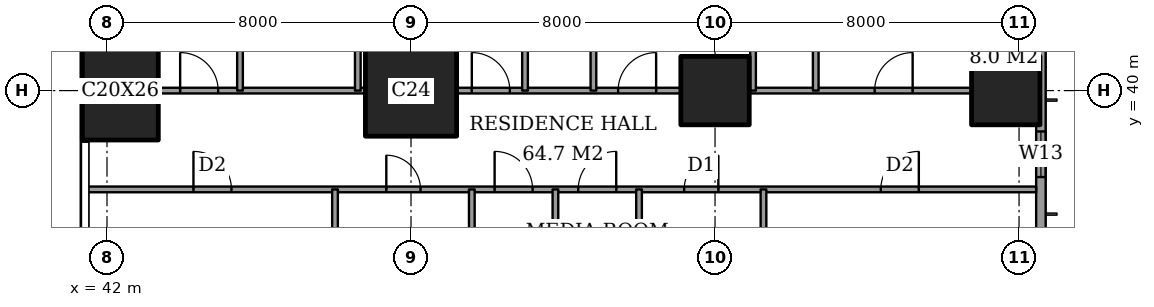
"""IFC4 building model, lengths in metres.
Left out: names, types, materials, properties, quantities, classifications, styles, units other than length and angle.
Written with IfcOpenShell. Run it as: python <this file> out.ifc"""

import sys

from ifc_helpers import new_model, si_unit, direction, frame, frame_2d, origin, origin_2d, place, context, subcontext, project, spatial, rectangle, extrude, element, fill, save


model = new_model("IFC4")
c1 = context("Model", 3, precision=1e-05, world=origin(), true_north=direction((0.0, 1.0)))
c2 = subcontext(c1, "Body", "Model", "MODEL_VIEW")
j1 = project(units=[si_unit("LENGTHUNIT", "METRE"), si_unit("PLANEANGLEUNIT", "RADIAN")], contexts=[c1])
p1 = place(None, origin())
s1 = spatial("IfcSite", under=j1, at=p1, CompositionType="ELEMENT")
p2 = place(p1, origin())
s2 = spatial("IfcBuilding", under=s1, at=p2, CompositionType="ELEMENT")
p3 = place(p2, frame((0.0, 0.0, 221.8)))
s3 = spatial("IfcBuildingStorey", under=s2, at=p3, CompositionType="ELEMENT", Elevation=221.8)
p4 = place(p3, frame((42.35, 40.0, 0.0), z_axis=(0.0, 0.0, 1.0), x_axis=(1.0, 0.0, 0.0)))
e1 = element("IfcColumn", 1, at=p4, inside=s3, PredefinedType="COLUMN", context=c2, shape_type="SweptSolid", body=[
    extrude(rectangle(XDim=2.0, YDim=2.6, at=origin_2d()), origin(), (0.0, 0.0, 1.0), 3.6),
])
p5 = place(p3, frame((50.0, 40.0, 0.0), z_axis=(0.0, 0.0, 1.0), x_axis=(1.0, 0.0, 0.0)))
e2 = element("IfcColumn", 2, at=p5, inside=s3, PredefinedType="COLUMN", context=c2, shape_type="SweptSolid", body=[
    extrude(rectangle(XDim=2.4, YDim=2.4, at=origin_2d()), origin(), (0.0, 0.0, 1.0), 3.6),
])
for number, where, z_axis, x_axis in (
    (3, (58.0, 40.0, 0.0), (0.0, 0.0, 1.0), (1.0, 0.0, 0.0)),
    (4, (65.65, 40.0, 0.0), (0.0, 0.0, 1.0), (1.0, 0.0, 0.0)),
):
    element("IfcColumn", number, at=place(p3, frame(where, z_axis=z_axis, x_axis=x_axis)), inside=s3, PredefinedType="COLUMN", context=c2, shape_type="SweptSolid", body=[
        extrude(rectangle(XDim=1.8, YDim=1.8, at=origin_2d()), origin(), (0.0, 0.0, 1.0), 3.6),
    ])
p6 = place(p3, frame((66.575, 3.175, 0.0), z_axis=(0.0, 0.0, 1.0), x_axis=(0.0, 1.0, 0.0)))
e5 = element("IfcWall", 5, at=p6, inside=s3, PredefinedType="SOLIDWALL", context=c2, shape_type="SweptSolid", body=[
    extrude(rectangle(XDim=41.65, YDim=0.25, at=frame_2d((20.825, 0.0))), origin(), (0.0, 0.0, 1.0), 3.6),
])
p7 = place(p6, frame((0.825, 0.0, 0.2)))
e6 = element("IfcOpeningElement", 6, at=p7, cuts=e5, PredefinedType="OPENING", context=c2, shape_type="SweptSolid", body=[
    extrude(rectangle(XDim=2.4, YDim=2.4, at=frame_2d((1.2, 1.2))), frame((0.0, 0.135, 0.0), z_axis=(0.0, -1.0, 0.0), x_axis=(1.0, 0.0, 0.0)), (0.0, 0.0, 1.0), 0.27),
])
p8 = place(p6, frame((6.225, 0.0, 0.2)))
e7 = element("IfcOpeningElement", 7, at=p8, cuts=e5, PredefinedType="OPENING", context=c2, shape_type="SweptSolid", body=[
    extrude(rectangle(XDim=1.2, YDim=2.4, at=frame_2d((0.6, 1.2))), frame((0.0, 0.135, 0.0), z_axis=(0.0, -1.0, 0.0), x_axis=(1.0, 0.0, 0.0)), (0.0, 0.0, 1.0), 0.27),
])
p9 = place(p6, frame((8.675, 0.0, 0.2)))
e8 = element("IfcOpeningElement", 8, at=p9, cuts=e5, PredefinedType="OPENING", context=c2, shape_type="SweptSolid", body=[
    extrude(rectangle(XDim=2.4, YDim=2.4, at=frame_2d((1.2, 1.2))), frame((0.0, 0.135, 0.0), z_axis=(0.0, -1.0, 0.0), x_axis=(1.0, 0.0, 0.0)), (0.0, 0.0, 1.0), 0.27),
])
p10 = place(p6, frame((15.675, 0.0, 0.2)))
e9 = element("IfcOpeningElement", 9, at=p10, cuts=e5, PredefinedType="OPENING", context=c2, shape_type="SweptSolid", body=[
    extrude(rectangle(XDim=2.4, YDim=2.4, at=frame_2d((1.2, 1.2))), frame((0.0, 0.135, 0.0), z_axis=(0.0, -1.0, 0.0), x_axis=(1.0, 0.0, 0.0)), (0.0, 0.0, 1.0), 0.27),
])
p11 = place(p6, frame((23.575, 0.0, 0.2)))
e10 = element("IfcOpeningElement", 10, at=p11, cuts=e5, PredefinedType="OPENING", context=c2, shape_type="SweptSolid", body=[
    extrude(rectangle(XDim=2.4, YDim=2.4, at=frame_2d((1.2, 1.2))), frame((0.0, 0.135, 0.0), z_axis=(0.0, -1.0, 0.0), x_axis=(1.0, 0.0, 0.0)), (0.0, 0.0, 1.0), 0.27),
])
p12 = place(p6, frame((30.775, 0.0, 0.2)))
e11 = element("IfcOpeningElement", 11, at=p12, cuts=e5, PredefinedType="OPENING", context=c2, shape_type="SweptSolid", body=[
    extrude(rectangle(XDim=2.4, YDim=2.4, at=frame_2d((1.2, 1.2))), frame((0.0, 0.135, 0.0), z_axis=(0.0, -1.0, 0.0), x_axis=(1.0, 0.0, 0.0)), (0.0, 0.0, 1.0), 0.27),
])
p13 = place(p6, frame((34.55, 0.0, 0.2)))
e12 = element("IfcOpeningElement", 12, at=p13, cuts=e5, PredefinedType="OPENING", context=c2, shape_type="SweptSolid", body=[
    extrude(rectangle(XDim=1.2, YDim=2.4, at=frame_2d((0.6, 1.2))), frame((0.0, 0.135, 0.0), z_axis=(0.0, -1.0, 0.0), x_axis=(1.0, 0.0, 0.0)), (0.0, 0.0, 1.0), 0.27),
])
p14 = place(p6, frame((38.425, 0.0, 0.2)))
e13 = element("IfcOpeningElement", 13, at=p14, cuts=e5, PredefinedType="OPENING", context=c2, shape_type="SweptSolid", body=[
    extrude(rectangle(XDim=2.4, YDim=2.4, at=frame_2d((1.2, 1.2))), frame((0.0, 0.135, 0.0), z_axis=(0.0, -1.0, 0.0), x_axis=(1.0, 0.0, 0.0)), (0.0, 0.0, 1.0), 0.27),
])
p15 = place(p3, frame((41.439, 37.4, 0.0), z_axis=(0.0, 0.0, 1.0), x_axis=(1.0, 0.0, 0.0)))
e14 = element("IfcWall", 14, at=p15, inside=s3, PredefinedType="PARTITIONING", context=c2, shape_type="SweptSolid", body=[
    extrude(rectangle(XDim=25.011, YDim=0.15, at=frame_2d((12.505, 0.0))), origin(), (0.0, 0.0, 1.0), 3.25),
])
p16 = place(p15, frame((10.761, 0.0, 0.0)))
e15 = element("IfcOpeningElement", 15, at=p16, cuts=e14, PredefinedType="OPENING", context=c2, shape_type="SweptSolid", body=[
    extrude(rectangle(XDim=1.0, YDim=2.1, at=frame_2d((0.5, 1.05))), frame((0.0, 0.085, 0.0), z_axis=(0.0, -1.0, 0.0), x_axis=(1.0, 0.0, 0.0)), (0.0, 0.0, 1.0), 0.17),
])
p17 = place(p15, frame((20.924, 0.0, 0.0)))
e16 = element("IfcOpeningElement", 16, at=p17, cuts=e14, PredefinedType="OPENING", context=c2, shape_type="SweptSolid", body=[
    extrude(rectangle(XDim=1.0, YDim=2.1, at=frame_2d((0.5, 1.05))), frame((0.0, 0.085, 0.0), z_axis=(0.0, -1.0, 0.0), x_axis=(1.0, 0.0, 0.0)), (0.0, 0.0, 1.0), 0.17),
])
p18 = place(p15, frame((15.749, 0.0, 0.0)))
e17 = element("IfcOpeningElement", 17, at=p18, cuts=e14, PredefinedType="OPENING", context=c2, shape_type="SweptSolid", body=[
    extrude(rectangle(XDim=0.9, YDim=2.1, at=frame_2d((0.45, 1.05))), frame((0.0, 0.085, 0.0), z_axis=(0.0, -1.0, 0.0), x_axis=(1.0, 0.0, 0.0)), (0.0, 0.0, 1.0), 0.17),
])
p19 = place(p15, frame((12.961, 0.0, 0.0)))
e18 = element("IfcOpeningElement", 18, at=p19, cuts=e14, PredefinedType="OPENING", context=c2, shape_type="SweptSolid", body=[
    extrude(rectangle(XDim=1.0, YDim=2.1, at=frame_2d((0.5, 1.05))), frame((0.0, 0.085, 0.0), z_axis=(0.0, -1.0, 0.0), x_axis=(1.0, 0.0, 0.0)), (0.0, 0.0, 1.0), 0.17),
])
p20 = place(p15, frame((7.911, 0.0, 0.0)))
e19 = element("IfcOpeningElement", 19, at=p20, cuts=e14, PredefinedType="OPENING", context=c2, shape_type="SweptSolid", body=[
    extrude(rectangle(XDim=0.9, YDim=2.1, at=frame_2d((0.45, 1.05))), frame((0.0, 0.085, 0.0), z_axis=(0.0, -1.0, 0.0), x_axis=(1.0, 0.0, 0.0)), (0.0, 0.0, 1.0), 0.17),
])
p21 = place(p15, frame((2.836, 0.0, 0.0)))
e20 = element("IfcOpeningElement", 20, at=p21, cuts=e14, PredefinedType="OPENING", context=c2, shape_type="SweptSolid", body=[
    extrude(rectangle(XDim=1.0, YDim=2.1, at=frame_2d((0.5, 1.05))), frame((0.0, 0.085, 0.0), z_axis=(0.0, -1.0, 0.0), x_axis=(1.0, 0.0, 0.0)), (0.0, 0.0, 1.0), 0.17),
])
p22 = place(p3, frame((43.35, 40.0, 0.0), z_axis=(0.0, 0.0, 1.0), x_axis=(1.0, 0.0, 0.0)))
e21 = element("IfcWall", 21, at=p22, inside=s3, PredefinedType="PARTITIONING", context=c2, shape_type="SweptSolid", body=[
    extrude(rectangle(XDim=5.45, YDim=0.15, at=frame_2d((2.725, 0.0))), origin(), (0.0, 0.0, 1.0), 3.25),
])
p23 = place(p22, frame((0.575, 0.0, 0.0)))
e22 = element("IfcOpeningElement", 22, at=p23, cuts=e21, PredefinedType="OPENING", context=c2, shape_type="SweptSolid", body=[
    extrude(rectangle(XDim=1.0, YDim=2.1, at=frame_2d((0.5, 1.05))), frame((0.0, 0.085, 0.0), z_axis=(0.0, -1.0, 0.0), x_axis=(1.0, 0.0, 0.0)), (0.0, 0.0, 1.0), 0.17),
])
p24 = place(p3, frame((51.2, 40.0, 0.0), z_axis=(0.0, 0.0, 1.0), x_axis=(1.0, 0.0, 0.0)))
e23 = element("IfcWall", 23, at=p24, inside=s3, PredefinedType="PARTITIONING", context=c2, shape_type="SweptSolid", body=[
    extrude(rectangle(XDim=5.9, YDim=0.15, at=frame_2d((2.95, 0.0))), origin(), (0.0, 0.0, 1.0), 3.25),
])
p25 = place(p24, frame((4.25, 0.0, 0.0)))
e24 = element("IfcOpeningElement", 24, at=p25, cuts=e23, PredefinedType="OPENING", context=c2, shape_type="SweptSolid", body=[
    extrude(rectangle(XDim=1.0, YDim=2.1, at=frame_2d((0.5, 1.05))), frame((0.0, 0.085, 0.0), z_axis=(0.0, -1.0, 0.0), x_axis=(1.0, 0.0, 0.0)), (0.0, 0.0, 1.0), 0.17),
])
p26 = place(p24, frame((0.4, 0.0, 0.0)))
e25 = element("IfcOpeningElement", 25, at=p26, cuts=e23, PredefinedType="OPENING", context=c2, shape_type="SweptSolid", body=[
    extrude(rectangle(XDim=1.0, YDim=2.1, at=frame_2d((0.5, 1.05))), frame((0.0, 0.085, 0.0), z_axis=(0.0, -1.0, 0.0), x_axis=(1.0, 0.0, 0.0)), (0.0, 0.0, 1.0), 0.17),
])
p27 = place(p3, frame((58.9, 40.0, 0.0), z_axis=(0.0, 0.0, 1.0), x_axis=(1.0, 0.0, 0.0)))
e26 = element("IfcWall", 26, at=p27, inside=s3, PredefinedType="PARTITIONING", context=c2, shape_type="SweptSolid", body=[
    extrude(rectangle(XDim=5.85, YDim=0.15, at=frame_2d((2.925, 0.0))), origin(), (0.0, 0.0, 1.0), 3.25),
])
p28 = place(p27, frame((3.3, 0.0, 0.0)))
e27 = element("IfcOpeningElement", 27, at=p28, cuts=e26, PredefinedType="OPENING", context=c2, shape_type="SweptSolid", body=[
    extrude(rectangle(XDim=1.0, YDim=2.1, at=frame_2d((0.5, 1.05))), frame((0.0, 0.085, 0.0), z_axis=(0.0, -1.0, 0.0), x_axis=(1.0, 0.0, 0.0)), (0.0, 0.0, 1.0), 0.17),
])
p29 = place(p3, frame((45.5, 40.0, 0.0), z_axis=(0.0, 0.0, 1.0), x_axis=(0.0, 1.0, 0.0)))
e28 = element("IfcWall", 28, at=p29, inside=s3, PredefinedType="PARTITIONING", context=c2, shape_type="SweptSolid", body=[
    extrude(rectangle(XDim=8.45, YDim=0.15, at=frame_2d((4.225, 0.0))), origin(), (0.0, 0.0, 1.0), 3.25),
])
p30 = place(p3, frame((48.0, 28.0, 0.0), z_axis=(0.0, 0.0, 1.0), x_axis=(0.0, 1.0, 0.0)))
e29 = element("IfcWall", 29, at=p30, inside=s3, PredefinedType="PARTITIONING", context=c2, shape_type="SweptSolid", body=[
    extrude(rectangle(XDim=9.4, YDim=0.15, at=frame_2d((4.7, 0.0))), origin(), (0.0, 0.0, 1.0), 3.25),
])
p31 = place(p30, frame((0.5, 0.0, 0.0)))
e30 = element("IfcOpeningElement", 30, at=p31, cuts=e29, PredefinedType="OPENING", context=c2, shape_type="SweptSolid", body=[
    extrude(rectangle(XDim=1.0, YDim=2.1, at=frame_2d((0.5, 1.05))), frame((0.0, 0.085, 0.0), z_axis=(0.0, -1.0, 0.0), x_axis=(1.0, 0.0, 0.0)), (0.0, 0.0, 1.0), 0.17),
])
p32 = place(p3, frame((48.6, 40.0, 0.0), z_axis=(0.0, 0.0, 1.0), x_axis=(0.0, 1.0, 0.0)))
e31 = element("IfcWall", 31, at=p32, inside=s3, PredefinedType="PARTITIONING", context=c2, shape_type="SweptSolid", body=[
    extrude(rectangle(XDim=8.45, YDim=0.15, at=frame_2d((4.225, 0.0))), origin(), (0.0, 0.0, 1.0), 3.25),
])
p33 = place(p32, frame((3.775, 0.0, 0.0)))
e32 = element("IfcOpeningElement", 32, at=p33, cuts=e31, PredefinedType="OPENING", context=c2, shape_type="SweptSolid", body=[
    extrude(rectangle(XDim=0.9, YDim=2.1, at=frame_2d((0.45, 1.05))), frame((0.0, 0.085, 0.0), z_axis=(0.0, -1.0, 0.0), x_axis=(1.0, 0.0, 0.0)), (0.0, 0.0, 1.0), 0.17),
])
p34 = place(p3, frame((51.6, 30.0, 0.0), z_axis=(0.0, 0.0, 1.0), x_axis=(0.0, 1.0, 0.0)))
e33 = element("IfcWall", 33, at=p34, inside=s3, PredefinedType="PARTITIONING", context=c2, shape_type="SweptSolid", body=[
    extrude(rectangle(XDim=7.4, YDim=0.15, at=frame_2d((3.7, 0.0))), origin(), (0.0, 0.0, 1.0), 3.25),
])
p35 = place(p3, frame((53.0, 40.0, 0.0), z_axis=(0.0, 0.0, 1.0), x_axis=(0.0, 1.0, 0.0)))
e34 = element("IfcWall", 34, at=p35, inside=s3, PredefinedType="PARTITIONING", context=c2, shape_type="SweptSolid", body=[
    extrude(rectangle(XDim=8.45, YDim=0.15, at=frame_2d((4.225, 0.0))), origin(), (0.0, 0.0, 1.0), 3.25),
])
p36 = place(p3, frame((53.8, 30.0, 0.0), z_axis=(0.0, 0.0, 1.0), x_axis=(0.0, 1.0, 0.0)))
e35 = element("IfcWall", 35, at=p36, inside=s3, PredefinedType="PARTITIONING", context=c2, shape_type="SweptSolid", body=[
    extrude(rectangle(XDim=7.4, YDim=0.15, at=frame_2d((3.7, 0.0))), origin(), (0.0, 0.0, 1.0), 3.25),
])
p37 = place(p3, frame((54.8, 40.0, 0.0), z_axis=(0.0, 0.0, 1.0), x_axis=(0.0, 1.0, 0.0)))
e36 = element("IfcWall", 36, at=p37, inside=s3, PredefinedType="PARTITIONING", context=c2, shape_type="SweptSolid", body=[
    extrude(rectangle(XDim=8.45, YDim=0.15, at=frame_2d((4.225, 0.0))), origin(), (0.0, 0.0, 1.0), 3.25),
])
p38 = place(p37, frame((3.775, 0.0, 0.0)))
e37 = element("IfcOpeningElement", 37, at=p38, cuts=e36, PredefinedType="OPENING", context=c2, shape_type="SweptSolid", body=[
    extrude(rectangle(XDim=0.9, YDim=2.1, at=frame_2d((0.45, 1.05))), frame((0.0, 0.085, 0.0), z_axis=(0.0, -1.0, 0.0), x_axis=(1.0, 0.0, 0.0)), (0.0, 0.0, 1.0), 0.17),
])
p39 = place(p3, frame((56.0, 28.0, 0.0), z_axis=(0.0, 0.0, 1.0), x_axis=(0.0, 1.0, 0.0)))
e38 = element("IfcWall", 38, at=p39, inside=s3, PredefinedType="PARTITIONING", context=c2, shape_type="SweptSolid", body=[
    extrude(rectangle(XDim=9.4, YDim=0.15, at=frame_2d((4.7, 0.0))), origin(), (0.0, 0.0, 1.0), 3.25),
])
p40 = place(p39, frame((0.5, 0.0, 0.0)))
e39 = element("IfcOpeningElement", 39, at=p40, cuts=e38, PredefinedType="OPENING", context=c2, shape_type="SweptSolid", body=[
    extrude(rectangle(XDim=1.0, YDim=2.1, at=frame_2d((0.5, 1.05))), frame((0.0, 0.085, 0.0), z_axis=(0.0, -1.0, 0.0), x_axis=(1.0, 0.0, 0.0)), (0.0, 0.0, 1.0), 0.17),
])
p41 = place(p3, frame((59.0, 40.0, 0.0), z_axis=(0.0, 0.0, 1.0), x_axis=(0.0, 1.0, 0.0)))
e40 = element("IfcWall", 40, at=p41, inside=s3, PredefinedType="PARTITIONING", context=c2, shape_type="SweptSolid", body=[
    extrude(rectangle(XDim=8.45, YDim=0.15, at=frame_2d((4.225, 0.0))), origin(), (0.0, 0.0, 1.0), 3.25),
])
p42 = place(p3, frame((59.275, 33.2, 0.0), z_axis=(0.0, 0.0, 1.0), x_axis=(0.0, 1.0, 0.0)))
e41 = element("IfcWall", 41, at=p42, inside=s3, PredefinedType="PARTITIONING", context=c2, shape_type="SweptSolid", body=[
    extrude(rectangle(XDim=4.2, YDim=0.15, at=frame_2d((2.1, 0.0))), origin(), (0.0, 0.0, 1.0), 3.25),
])
p43 = place(p3, frame((60.65, 40.0, 0.0), z_axis=(0.0, 0.0, 1.0), x_axis=(0.0, 1.0, 0.0)))
e42 = element("IfcWall", 42, at=p43, inside=s3, PredefinedType="PARTITIONING", context=c2, shape_type="SweptSolid", body=[
    extrude(rectangle(XDim=8.45, YDim=0.15, at=frame_2d((4.225, 0.0))), origin(), (0.0, 0.0, 1.0), 3.25),
])
p44 = place(p43, frame((3.775, 0.0, 0.0)))
e43 = element("IfcOpeningElement", 43, at=p44, cuts=e42, PredefinedType="OPENING", context=c2, shape_type="SweptSolid", body=[
    extrude(rectangle(XDim=0.9, YDim=2.1, at=frame_2d((0.45, 1.05))), frame((0.0, 0.085, 0.0), z_axis=(0.0, -1.0, 0.0), x_axis=(1.0, 0.0, 0.0)), (0.0, 0.0, 1.0), 0.17),
])
p45 = place(p3, frame((64.75, 40.9, 0.0), z_axis=(0.0, 0.0, 1.0), x_axis=(0.0, 1.0, 0.0)))
e44 = element("IfcWall", 44, at=p45, inside=s3, PredefinedType="PARTITIONING", context=c2, shape_type="SweptSolid", body=[
    extrude(rectangle(XDim=3.8, YDim=0.15, at=frame_2d((1.9, 0.0))), origin(), (0.0, 0.0, 1.0), 3.25),
])
p46 = place(p45, frame((1.45, 0.0, 0.0)))
e45 = element("IfcOpeningElement", 45, at=p46, cuts=e44, PredefinedType="OPENING", context=c2, shape_type="SweptSolid", body=[
    extrude(rectangle(XDim=0.9, YDim=2.1, at=frame_2d((0.45, 1.05))), frame((0.0, 0.085, 0.0), z_axis=(0.0, -1.0, 0.0), x_axis=(1.0, 0.0, 0.0)), (0.0, 0.0, 1.0), 0.17),
])
p47 = place(p13, origin())
e46 = element("IfcWindow", 46, at=p47, inside=s3, PartitioningType="SINGLE_PANEL", PredefinedType="WINDOW", context=c2, shape_type="SweptSolid", body=[
    extrude(rectangle(XDim=1.2, YDim=2.4, at=frame_2d((0.6, 1.2))), frame((0.0, 0.03, 0.0), z_axis=(0.0, -1.0, 0.0), x_axis=(1.0, 0.0, 0.0)), (0.0, 0.0, 1.0), 0.06),
])
fill(e12, e46)
p48 = place(p28, origin())
e47 = element("IfcDoor", 47, at=p48, inside=s3, OperationType="SINGLE_SWING_LEFT", PredefinedType="DOOR", context=c2, shape_type="SweptSolid", body=[
    extrude(rectangle(XDim=1.0, YDim=2.1, at=frame_2d((0.5, 1.05))), frame((0.0, 0.025, 0.0), z_axis=(0.0, -1.0, 0.0), x_axis=(1.0, 0.0, 0.0)), (0.0, 0.0, 1.0), 0.05),
])
fill(e27, e47)
p49 = place(p25, origin())
e48 = element("IfcDoor", 48, at=p49, inside=s3, OperationType="SINGLE_SWING_LEFT", PredefinedType="DOOR", context=c2, shape_type="SweptSolid", body=[
    extrude(rectangle(XDim=1.0, YDim=2.1, at=frame_2d((0.5, 1.05))), frame((0.0, 0.025, 0.0), z_axis=(0.0, -1.0, 0.0), x_axis=(1.0, 0.0, 0.0)), (0.0, 0.0, 1.0), 0.05),
])
fill(e24, e48)
p50 = place(p26, origin())
e49 = element("IfcDoor", 49, at=p50, inside=s3, OperationType="SINGLE_SWING_RIGHT", PredefinedType="DOOR", context=c2, shape_type="SweptSolid", body=[
    extrude(rectangle(XDim=1.0, YDim=2.1, at=frame_2d((0.5, 1.05))), frame((0.0, 0.025, 0.0), z_axis=(0.0, -1.0, 0.0), x_axis=(1.0, 0.0, 0.0)), (0.0, 0.0, 1.0), 0.05),
])
fill(e25, e49)
p51 = place(p23, origin())
e50 = element("IfcDoor", 50, at=p51, inside=s3, OperationType="SINGLE_SWING_RIGHT", PredefinedType="DOOR", context=c2, shape_type="SweptSolid", body=[
    extrude(rectangle(XDim=1.0, YDim=2.1, at=frame_2d((0.5, 1.05))), frame((0.0, 0.025, 0.0), z_axis=(0.0, -1.0, 0.0), x_axis=(1.0, 0.0, 0.0)), (0.0, 0.0, 1.0), 0.05),
])
fill(e22, e50)
p52 = place(p16, origin())
e51 = element("IfcDoor", 51, at=p52, inside=s3, OperationType="SINGLE_SWING_RIGHT", PredefinedType="DOOR", context=c2, shape_type="SweptSolid", body=[
    extrude(rectangle(XDim=1.0, YDim=2.1, at=frame_2d((0.5, 1.05))), frame((0.0, 0.025, 0.0), z_axis=(0.0, -1.0, 0.0), x_axis=(1.0, 0.0, 0.0)), (0.0, 0.0, 1.0), 0.05),
])
fill(e15, e51)
p53 = place(p17, origin())
e52 = element("IfcDoor", 52, at=p53, inside=s3, OperationType="SINGLE_SWING_LEFT", PredefinedType="DOOR", context=c2, shape_type="SweptSolid", body=[
    extrude(rectangle(XDim=1.0, YDim=2.1, at=frame_2d((0.5, 1.05))), frame((0.0, 0.025, 0.0), z_axis=(0.0, -1.0, 0.0), x_axis=(1.0, 0.0, 0.0)), (0.0, 0.0, 1.0), 0.05),
])
fill(e16, e52)
p54 = place(p18, origin())
e53 = element("IfcDoor", 53, at=p54, inside=s3, OperationType="SINGLE_SWING_LEFT", PredefinedType="DOOR", context=c2, shape_type="SweptSolid", body=[
    extrude(rectangle(XDim=0.9, YDim=2.1, at=frame_2d((0.45, 1.05))), frame((0.0, 0.025, 0.0), z_axis=(0.0, -1.0, 0.0), x_axis=(1.0, 0.0, 0.0)), (0.0, 0.0, 1.0), 0.05),
])
fill(e17, e53)
p55 = place(p19, origin())
e54 = element("IfcDoor", 54, at=p55, inside=s3, OperationType="SINGLE_SWING_LEFT", PredefinedType="DOOR", context=c2, shape_type="SweptSolid", body=[
    extrude(rectangle(XDim=1.0, YDim=2.1, at=frame_2d((0.5, 1.05))), frame((0.0, 0.025, 0.0), z_axis=(0.0, -1.0, 0.0), x_axis=(1.0, 0.0, 0.0)), (0.0, 0.0, 1.0), 0.05),
])
fill(e18, e54)
p56 = place(p20, origin())
e55 = element("IfcDoor", 55, at=p56, inside=s3, OperationType="SINGLE_SWING_RIGHT", PredefinedType="DOOR", context=c2, shape_type="SweptSolid", body=[
    extrude(rectangle(XDim=0.9, YDim=2.1, at=frame_2d((0.45, 1.05))), frame((0.0, 0.025, 0.0), z_axis=(0.0, -1.0, 0.0), x_axis=(1.0, 0.0, 0.0)), (0.0, 0.0, 1.0), 0.05),
])
fill(e19, e55)
p57 = place(p21, origin())
e56 = element("IfcDoor", 56, at=p57, inside=s3, OperationType="SINGLE_SWING_RIGHT", PredefinedType="DOOR", context=c2, shape_type="SweptSolid", body=[
    extrude(rectangle(XDim=1.0, YDim=2.1, at=frame_2d((0.5, 1.05))), frame((0.0, 0.025, 0.0), z_axis=(0.0, -1.0, 0.0), x_axis=(1.0, 0.0, 0.0)), (0.0, 0.0, 1.0), 0.05),
])
fill(e20, e56)
save(model, sys.argv[1])
